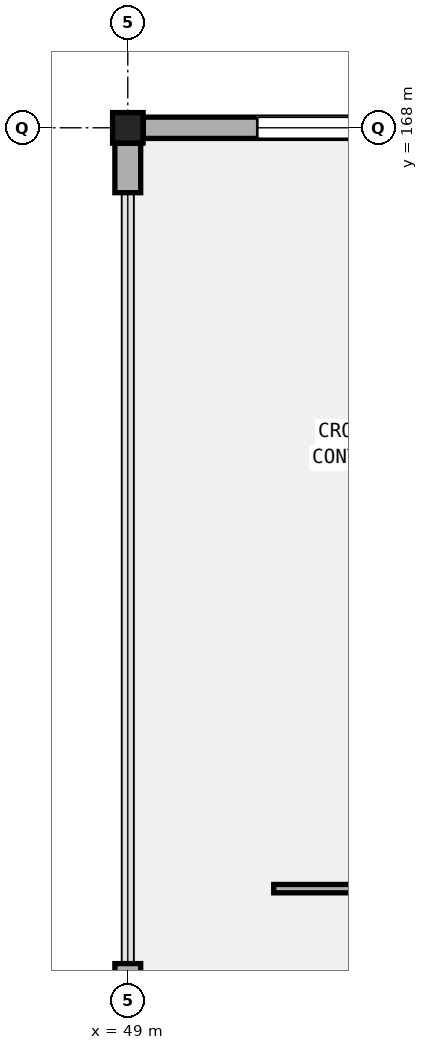
"""IFC4 building model, lengths in metres.
Left out: names, types, materials, properties, quantities, classifications, styles, units other than length and angle.
Written with IfcOpenShell. Run it as: python <this file> out.ifc"""

import sys

from ifc_helpers import new_model, si_unit, direction, frame, frame_2d, origin, origin_2d, place, context, subcontext, project, spatial, rectangle, hollow_rectangle, extrude, element, fill, save


model = new_model("IFC4")
c1 = context("Model", 3, precision=1e-05, world=origin(), true_north=direction((0.0, 1.0)))
c2 = subcontext(c1, "Body", "Model", "MODEL_VIEW")
j1 = project(units=[si_unit("LENGTHUNIT", "METRE"), si_unit("PLANEANGLEUNIT", "RADIAN")], contexts=[c1])
p1 = place(None, origin())
s1 = spatial("IfcSite", under=j1, at=p1, CompositionType="ELEMENT")
p2 = place(p1, origin())
s2 = spatial("IfcBuilding", under=s1, at=p2, CompositionType="ELEMENT")
p3 = place(p2, frame((0.0, 0.0, 15.3)))
s3 = spatial("IfcBuildingStorey", under=s2, at=p3, CompositionType="ELEMENT", Elevation=15.3)
p4 = place(p3, frame((49.0, 168.0, 0.0), z_axis=(0.0, 0.0, 1.0), x_axis=(1.0, 0.0, 0.0)))
e1 = element("IfcColumn", 1, at=p4, inside=s3, PredefinedType="COLUMN", context=c2, shape_type="SweptSolid", body=[
    extrude(hollow_rectangle(XDim=0.4, YDim=0.4, WallThickness=0.016, InnerFilletRadius=0.016, OuterFilletRadius=0.032, at=origin_2d()), origin(), (0.0, 0.0, 1.0), 5.1),
])
p5 = place(p3, frame((49.204, 168.0, 0.0), z_axis=(0.0, 0.0, 1.0), x_axis=(1.0, 0.0, 0.0)))
e2 = element("IfcWall", 2, at=p5, inside=s3, PredefinedType="SOLIDWALL", context=c2, shape_type="SweptSolid", body=[
    extrude(rectangle(XDim=12.117, YDim=0.28, at=frame_2d((6.059, 0.0))), origin(), (0.0, 0.0, 1.0), 4.06),
])
p6 = place(p5, frame((1.5, 0.0, 0.95)))
e3 = element("IfcOpeningElement", 3, at=p6, cuts=e2, PredefinedType="OPENING", context=c2, shape_type="SweptSolid", body=[
    extrude(rectangle(XDim=3.3, YDim=2.25, at=frame_2d((1.65, 1.125))), frame((0.0, 0.15, 0.0), z_axis=(0.0, -1.0, 0.0), x_axis=(1.0, 0.0, 0.0)), (0.0, 0.0, 1.0), 0.3),
])
for number, where, z_axis, x_axis in (
    (4, (49.0, 156.354, 0.0), (0.0, 0.0, 1.0), (0.0, 1.0, 0.0)),
    (5, (49.0, 167.146, 0.0), (0.0, 0.0, 1.0), (0.0, 1.0, 0.0)),
):
    element("IfcWall", number, at=place(p3, frame(where, z_axis=z_axis, x_axis=x_axis)), inside=s3, PredefinedType="SOLIDWALL", context=c2, shape_type="SweptSolid", body=[
        extrude(rectangle(XDim=0.65, YDim=0.34, at=frame_2d((0.325, 0.0))), origin(), (0.0, 0.0, 1.0), 4.172),
    ])
p7 = place(p3, frame((50.92, 157.99, 0.0), z_axis=(0.0, 0.0, 1.0), x_axis=(1.0, 0.0, 0.0)))
e6 = element("IfcWall", 6, at=p7, inside=s3, PredefinedType="PARTITIONING", context=c2, shape_type="SweptSolid", body=[
    extrude(rectangle(XDim=10.42, YDim=0.11, at=frame_2d((5.21, 0.0))), origin(), (0.0, 0.0, 1.0), 4.22),
])
p8 = place(p7, frame((4.545, 0.0, 0.0)))
e7 = element("IfcOpeningElement", 7, at=p8, cuts=e6, PredefinedType="OPENING", context=c2, shape_type="SweptSolid", body=[
    extrude(rectangle(XDim=1.33, YDim=2.22, at=frame_2d((0.665, 1.11))), frame((0.0, 0.065, 0.0), z_axis=(0.0, -1.0, 0.0), x_axis=(1.0, 0.0, 0.0)), (0.0, 0.0, 1.0), 0.13),
])
p9 = place(p6, origin())
e8 = element("IfcWindow", 8, at=p9, inside=s3, PartitioningType="SINGLE_PANEL", PredefinedType="WINDOW", context=c2, shape_type="SweptSolid", body=[
    extrude(rectangle(XDim=3.3, YDim=2.25, at=frame_2d((1.65, 1.125))), frame((0.0, 0.03, 0.0), z_axis=(0.0, -1.0, 0.0), x_axis=(1.0, 0.0, 0.0)), (0.0, 0.0, 1.0), 0.06),
])
fill(e3, e8)
save(model, sys.argv[1])
